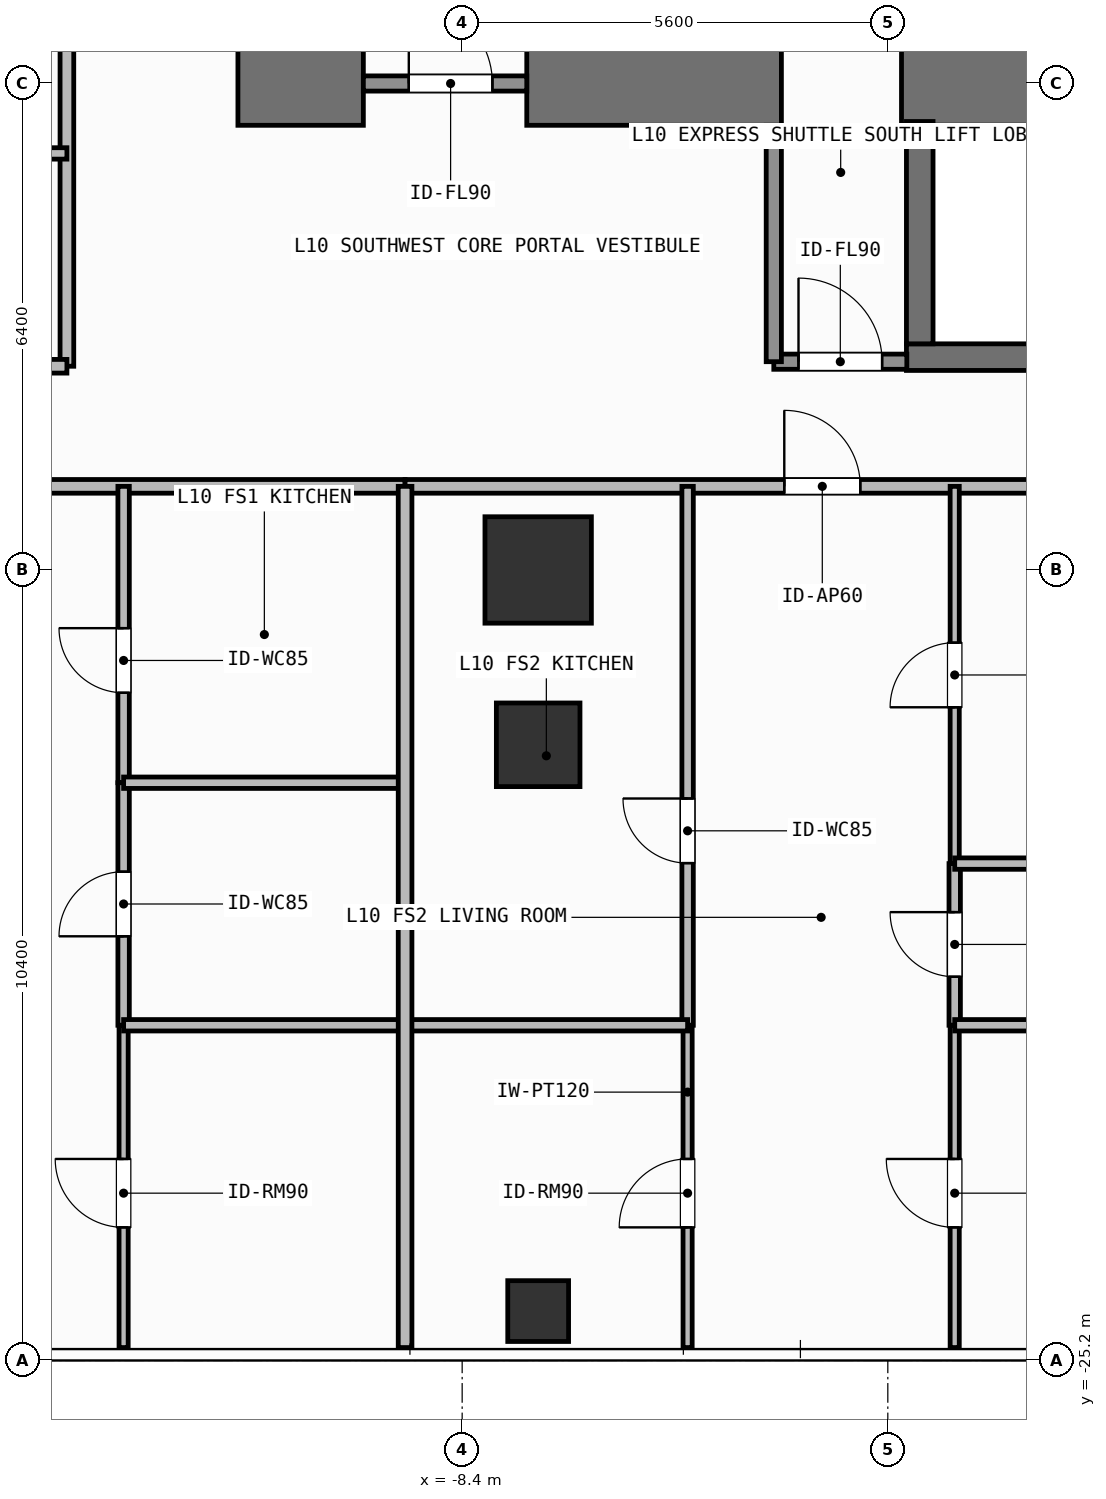
"""IFC4 building model, lengths in metres.
Left out: names, types, materials, properties, quantities, classifications, styles, units other than length and angle.
Written with IfcOpenShell. Run it as: python <this file> out.ifc"""

import sys

from ifc_helpers import new_model, si_unit, direction, frame, frame_2d, origin, origin_2d, place, context, subcontext, project, spatial, rectangle, hollow_rectangle, extrude, element, fill, save


model = new_model("IFC4")
c1 = context("Model", 3, precision=1e-05, world=origin(), true_north=direction((0.0, 1.0)))
c2 = subcontext(c1, "Body", "Model", "MODEL_VIEW")
j1 = project(units=[si_unit("LENGTHUNIT", "METRE"), si_unit("PLANEANGLEUNIT", "RADIAN")], contexts=[c1])
p1 = place(None, origin())
s1 = spatial("IfcSite", under=j1, at=p1, CompositionType="ELEMENT")
p2 = place(p1, origin())
s2 = spatial("IfcBuilding", under=s1, at=p2, CompositionType="ELEMENT")
p3 = place(p2, frame((0.0, 0.0, 38.4)))
s3 = spatial("IfcBuildingStorey", under=s2, at=p3, CompositionType="ELEMENT", Elevation=38.4)
p4 = place(p3, frame((-11.35, -8.4, 0.0), z_axis=(0.0, 0.0, 1.0), x_axis=(1.0, 0.0, 0.0)))
e1 = element("IfcWall", 1, at=p4, inside=s3, PredefinedType="SHEAR", context=c2, shape_type="SweptSolid", body=[
    extrude(rectangle(XDim=1.65, YDim=1.1, at=frame_2d((0.825, 0.0))), origin(), (0.0, 0.0, 1.0), 3.9),
])
p5 = place(p3, frame((-7.55, -8.4, 0.0), z_axis=(0.0, 0.0, 1.0), x_axis=(1.0, 0.0, 0.0)))
e2 = element("IfcWall", 2, at=p5, inside=s3, PredefinedType="SHEAR", context=c2, shape_type="SweptSolid", body=[
    extrude(rectangle(XDim=3.35, YDim=1.1, at=frame_2d((1.675, 0.0))), origin(), (0.0, 0.0, 1.0), 3.9),
])
p6 = place(p3, frame((-2.62, -8.4, 0.0), z_axis=(0.0, 0.0, 1.0), x_axis=(1.0, 0.0, 0.0)))
e3 = element("IfcWall", 3, at=p6, inside=s3, PredefinedType="SHEAR", context=c2, shape_type="SweptSolid", body=[
    extrude(rectangle(XDim=7.27, YDim=1.1, at=frame_2d((3.635, 0.0))), origin(), (0.0, 0.0, 1.0), 3.9),
])
p7 = place(p3, frame((-2.555, -12.0, 0.0), z_axis=(0.0, 0.0, 1.0), x_axis=(1.0, 0.0, 0.0)))
e4 = element("IfcWall", 4, at=p7, inside=s3, PredefinedType="SHEAR", context=c2, shape_type="SweptSolid", body=[
    extrude(rectangle(XDim=7.31, YDim=0.35, at=frame_2d((3.655, 0.0))), origin(), (0.0, 0.0, 1.0), 3.9),
])
p8 = place(p3, frame((-2.2, -8.988, 0.0), z_axis=(0.0, 0.0, 1.0), x_axis=(1.0, 0.0, 0.0)))
e5 = element("IfcWall", 5, at=p8, inside=s3, PredefinedType="SHEAR", context=c2, shape_type="SweptSolid", body=[
    extrude(rectangle(XDim=6.6, YDim=0.075, at=frame_2d((3.3, 0.0))), origin(), (0.0, 0.0, 1.0), 3.9),
])
p9 = place(p3, frame((-2.38, -11.825, 0.0), z_axis=(0.0, 0.0, 1.0), x_axis=(0.0, 1.0, 0.0)))
e6 = element("IfcWall", 6, at=p9, inside=s3, PredefinedType="SHEAR", context=c2, shape_type="SweptSolid", body=[
    extrude(rectangle(XDim=2.925, YDim=0.35, at=frame_2d((1.462, 0.0))), origin(), (0.0, 0.0, 1.0), 3.9),
])
p10 = place(p3, frame((-7.4, -14.8, 0.0), z_axis=(0.0, 0.0, 1.0), x_axis=(1.0, 0.0, 0.0)))
e7 = element("IfcColumn", 7, at=p10, inside=s3, PredefinedType="COLUMN", context=c2, shape_type="SweptSolid", body=[
    extrude(rectangle(XDim=1.4, YDim=1.4, at=origin_2d()), origin(), (0.0, 0.0, 1.0), 3.9),
])
p11 = place(p3, frame((-7.4, -17.1, 0.0), z_axis=(0.0, 0.0, 1.0), x_axis=(1.0, 0.0, 0.0)))
e8 = element("IfcColumn", 8, at=p11, inside=s3, PredefinedType="COLUMN", context=c2, shape_type="SweptSolid", body=[
    extrude(rectangle(XDim=1.1, YDim=1.1, at=origin_2d()), origin(), (0.0, 0.0, 1.0), 3.9),
])
p12 = place(p3, frame((-7.4, -24.55, 0.0), z_axis=(0.0, 0.0, 1.0), x_axis=(1.0, 0.0, 0.0)))
e9 = element("IfcColumn", 9, at=p12, inside=s3, PredefinedType="COLUMN", context=c2, shape_type="SweptSolid", body=[
    extrude(hollow_rectangle(XDim=0.8, YDim=0.8, WallThickness=0.036, at=origin_2d()), origin(), (0.0, 0.0, 1.0), 3.9),
])
p13 = place(p3, frame((-9.7, -8.4, 0.0), z_axis=(0.0, 0.0, 1.0), x_axis=(1.0, 0.0, 0.0)))
e10 = element("IfcWall", 10, at=p13, inside=s3, PredefinedType="SOLIDWALL", context=c2, shape_type="SweptSolid", body=[
    extrude(rectangle(XDim=2.15, YDim=0.2, at=frame_2d((1.075, 0.0))), origin(), (0.0, 0.0, 1.0), 2.72),
])
p14 = place(p13, frame((0.598, 0.0, 0.0)))
e11 = element("IfcOpeningElement", 11, at=p14, cuts=e10, PredefinedType="OPENING", context=c2, shape_type="SweptSolid", body=[
    extrude(rectangle(XDim=1.1, YDim=2.15, at=frame_2d((0.55, 1.075))), frame((0.0, 0.11, 0.0), z_axis=(0.0, -1.0, 0.0), x_axis=(1.0, 0.0, 0.0)), (0.0, 0.0, 1.0), 0.22),
])
p15 = place(p3, frame((-4.3, -12.06, 0.0), z_axis=(0.0, 0.0, 1.0), x_axis=(1.0, 0.0, 0.0)))
e12 = element("IfcWall", 12, at=p15, inside=s3, PredefinedType="SOLIDWALL", context=c2, shape_type="SweptSolid", body=[
    extrude(rectangle(XDim=1.75, YDim=0.2, at=frame_2d((0.875, 0.0))), origin(), (0.0, 0.0, 1.0), 3.68),
])
p16 = place(p15, frame((0.325, 0.0, 0.0)))
e13 = element("IfcOpeningElement", 13, at=p16, cuts=e12, PredefinedType="OPENING", context=c2, shape_type="SweptSolid", body=[
    extrude(rectangle(XDim=1.1, YDim=2.15, at=frame_2d((0.55, 1.075))), frame((0.0, 0.11, 0.0), z_axis=(0.0, -1.0, 0.0), x_axis=(1.0, 0.0, 0.0)), (0.0, 0.0, 1.0), 0.22),
])
p17 = place(p3, frame((-18.62, -13.7, 0.0), z_axis=(0.0, 0.0, 1.0), x_axis=(1.0, 0.0, 0.0)))
e14 = element("IfcWall", 14, at=p17, inside=s3, PredefinedType="PARTITIONING", context=c2, shape_type="SweptSolid", body=[
    extrude(rectangle(XDim=9.469, YDim=0.18, at=frame_2d((4.735, 0.0))), origin(), (0.0, 0.0, 1.0), 3.68),
])
p18 = place(p17, frame((1.931, 0.0, 0.0)))
e15 = element("IfcOpeningElement", 15, at=p18, cuts=e14, PredefinedType="OPENING", context=c2, shape_type="SweptSolid", body=[
    extrude(rectangle(XDim=1.0, YDim=2.2, at=frame_2d((0.5, 1.1))), frame((0.0, 0.1, 0.0), z_axis=(0.0, -1.0, 0.0), x_axis=(1.0, 0.0, 0.0)), (0.0, 0.0, 1.0), 0.2),
])
p19 = place(p3, frame((-12.854, -17.599, 0.0), z_axis=(0.0, 0.0, 1.0), x_axis=(0.0, 1.0, 0.0)))
e16 = element("IfcWall", 16, at=p19, inside=s3, PredefinedType="PARTITIONING", context=c2, shape_type="SweptSolid", body=[
    extrude(rectangle(XDim=3.899, YDim=0.15, at=frame_2d((1.95, 0.0))), origin(), (0.0, 0.0, 1.0), 3.68),
])
p20 = place(p19, frame((1.183, 0.0, 0.0)))
e17 = element("IfcOpeningElement", 17, at=p20, cuts=e16, PredefinedType="OPENING", context=c2, shape_type="SweptSolid", body=[
    extrude(rectangle(XDim=0.85, YDim=2.1, at=frame_2d((0.425, 1.05))), frame((0.0, 0.085, 0.0), z_axis=(0.0, -1.0, 0.0), x_axis=(1.0, 0.0, 0.0)), (0.0, 0.0, 1.0), 0.17),
])
p21 = place(p3, frame((-12.854, -20.79, 0.0), z_axis=(0.0, 0.0, 1.0), x_axis=(0.0, 1.0, 0.0)))
e18 = element("IfcWall", 18, at=p21, inside=s3, PredefinedType="PARTITIONING", context=c2, shape_type="SweptSolid", body=[
    extrude(rectangle(XDim=3.191, YDim=0.15, at=frame_2d((1.595, 0.0))), origin(), (0.0, 0.0, 1.0), 3.68),
])
p22 = place(p21, frame((1.17, 0.0, 0.0)))
e19 = element("IfcOpeningElement", 19, at=p22, cuts=e18, PredefinedType="OPENING", context=c2, shape_type="SweptSolid", body=[
    extrude(rectangle(XDim=0.85, YDim=2.1, at=frame_2d((0.425, 1.05))), frame((0.0, 0.085, 0.0), z_axis=(0.0, -1.0, 0.0), x_axis=(1.0, 0.0, 0.0)), (0.0, 0.0, 1.0), 0.17),
])
p23 = place(p3, frame((-12.854, -25.03, 0.0), z_axis=(0.0, 0.0, 1.0), x_axis=(0.0, 1.0, 0.0)))
e20 = element("IfcWall", 20, at=p23, inside=s3, PredefinedType="PARTITIONING", context=c2, shape_type="SweptSolid", body=[
    extrude(rectangle(XDim=4.24, YDim=0.12, at=frame_2d((2.12, 0.0))), origin(), (0.0, 0.0, 1.0), 3.68),
])
p24 = place(p23, frame((1.581, 0.0, 0.0)))
e21 = element("IfcOpeningElement", 21, at=p24, cuts=e20, PredefinedType="OPENING", context=c2, shape_type="SweptSolid", body=[
    extrude(rectangle(XDim=0.9, YDim=2.1, at=frame_2d((0.45, 1.05))), frame((0.0, 0.07, 0.0), z_axis=(0.0, -1.0, 0.0), x_axis=(1.0, 0.0, 0.0)), (0.0, 0.0, 1.0), 0.14),
])
p25 = place(p3, frame((-9.151, -13.7, 0.0), z_axis=(0.0, 0.0, 1.0), x_axis=(1.0, 0.0, 0.0)))
e22 = element("IfcWall", 22, at=p25, inside=s3, PredefinedType="PARTITIONING", context=c2, shape_type="SweptSolid", body=[
    extrude(rectangle(XDim=12.051, YDim=0.18, at=frame_2d((6.025, 0.0))), origin(), (0.0, 0.0, 1.0), 3.68),
])
p26 = place(p25, frame((4.989, 0.0, 0.0)))
e23 = element("IfcOpeningElement", 23, at=p26, cuts=e22, PredefinedType="OPENING", context=c2, shape_type="SweptSolid", body=[
    extrude(rectangle(XDim=1.0, YDim=2.2, at=frame_2d((0.5, 1.1))), frame((0.0, 0.1, 0.0), z_axis=(0.0, -1.0, 0.0), x_axis=(1.0, 0.0, 0.0)), (0.0, 0.0, 1.0), 0.2),
])
p27 = place(p3, frame((-5.434, -20.79, 0.0), z_axis=(0.0, 0.0, 1.0), x_axis=(0.0, 1.0, 0.0)))
e24 = element("IfcWall", 24, at=p27, inside=s3, PredefinedType="PARTITIONING", context=c2, shape_type="SweptSolid", body=[
    extrude(rectangle(XDim=7.09, YDim=0.15, at=frame_2d((3.545, 0.0))), origin(), (0.0, 0.0, 1.0), 3.68),
])
p28 = place(p27, frame((2.133, 0.0, 0.0)))
e25 = element("IfcOpeningElement", 25, at=p28, cuts=e24, PredefinedType="OPENING", context=c2, shape_type="SweptSolid", body=[
    extrude(rectangle(XDim=0.85, YDim=2.1, at=frame_2d((0.425, 1.05))), frame((0.0, 0.085, 0.0), z_axis=(0.0, -1.0, 0.0), x_axis=(1.0, 0.0, 0.0)), (0.0, 0.0, 1.0), 0.17),
])
p29 = place(p3, frame((-5.434, -25.03, 0.0), z_axis=(0.0, 0.0, 1.0), x_axis=(0.0, 1.0, 0.0)))
e26 = element("IfcWall", 26, at=p29, inside=s3, PredefinedType="PARTITIONING", context=c2, shape_type="SweptSolid", body=[
    extrude(rectangle(XDim=4.24, YDim=0.12, at=frame_2d((2.12, 0.0))), origin(), (0.0, 0.0, 1.0), 3.68),
])
p30 = place(p29, frame((1.581, 0.0, 0.0)))
e27 = element("IfcOpeningElement", 27, at=p30, cuts=e26, PredefinedType="OPENING", context=c2, shape_type="SweptSolid", body=[
    extrude(rectangle(XDim=0.9, YDim=2.1, at=frame_2d((0.45, 1.05))), frame((0.0, 0.07, 0.0), z_axis=(0.0, -1.0, 0.0), x_axis=(1.0, 0.0, 0.0)), (0.0, 0.0, 1.0), 0.14),
])
p31 = place(p3, frame((-1.92, -20.79, 0.0), z_axis=(0.0, 0.0, 1.0), x_axis=(0.0, 1.0, 0.0)))
e28 = element("IfcWall", 28, at=p31, inside=s3, PredefinedType="PARTITIONING", context=c2, shape_type="SweptSolid", body=[
    extrude(rectangle(XDim=2.127, YDim=0.15, at=frame_2d((1.063, 0.0))), origin(), (0.0, 0.0, 1.0), 3.68),
])
p32 = place(p31, frame((0.638, 0.0, 0.0)))
e29 = element("IfcOpeningElement", 29, at=p32, cuts=e28, PredefinedType="OPENING", context=c2, shape_type="SweptSolid", body=[
    extrude(rectangle(XDim=0.85, YDim=2.1, at=frame_2d((0.425, 1.05))), frame((0.0, 0.085, 0.0), z_axis=(0.0, -1.0, 0.0), x_axis=(1.0, 0.0, 0.0)), (0.0, 0.0, 1.0), 0.17),
])
p33 = place(p3, frame((-1.92, -18.663, 0.0), z_axis=(0.0, 0.0, 1.0), x_axis=(0.0, 1.0, 0.0)))
e30 = element("IfcWall", 30, at=p33, inside=s3, PredefinedType="PARTITIONING", context=c2, shape_type="SweptSolid", body=[
    extrude(rectangle(XDim=4.963, YDim=0.12, at=frame_2d((2.481, 0.0))), origin(), (0.0, 0.0, 1.0), 3.68),
])
p34 = place(p33, frame((2.056, 0.0, 0.0)))
e31 = element("IfcOpeningElement", 31, at=p34, cuts=e30, PredefinedType="OPENING", context=c2, shape_type="SweptSolid", body=[
    extrude(rectangle(XDim=0.85, YDim=2.1, at=frame_2d((0.425, 1.05))), frame((0.0, 0.07, 0.0), z_axis=(0.0, -1.0, 0.0), x_axis=(1.0, 0.0, 0.0)), (0.0, 0.0, 1.0), 0.14),
])
p35 = place(p3, frame((-1.92, -25.03, 0.0), z_axis=(0.0, 0.0, 1.0), x_axis=(0.0, 1.0, 0.0)))
e32 = element("IfcWall", 32, at=p35, inside=s3, PredefinedType="PARTITIONING", context=c2, shape_type="SweptSolid", body=[
    extrude(rectangle(XDim=4.24, YDim=0.12, at=frame_2d((2.12, 0.0))), origin(), (0.0, 0.0, 1.0), 3.68),
])
p36 = place(p35, frame((1.581, 0.0, 0.0)))
e33 = element("IfcOpeningElement", 33, at=p36, cuts=e32, PredefinedType="OPENING", context=c2, shape_type="SweptSolid", body=[
    extrude(rectangle(XDim=0.9, YDim=2.1, at=frame_2d((0.45, 1.05))), frame((0.0, 0.07, 0.0), z_axis=(0.0, -1.0, 0.0), x_axis=(1.0, 0.0, 0.0)), (0.0, 0.0, 1.0), 0.14),
])
p37 = place(p3, frame((-13.6, -12.12, 0.0), z_axis=(0.0, 0.0, 1.0), x_axis=(0.0, 1.0, 0.0)))
e34 = element("IfcWall", 34, at=p37, inside=s3, PredefinedType="PARTITIONING", context=c2, shape_type="SweptSolid", body=[
    extrude(rectangle(XDim=12.847, YDim=0.18, at=frame_2d((6.424, 0.0))), origin(), (0.0, 0.0, 1.0), 3.68),
])
p38 = place(p37, frame((5.48, 0.0, 0.0)))
e35 = element("IfcOpeningElement", 35, at=p38, cuts=e34, PredefinedType="OPENING", context=c2, shape_type="SweptSolid", body=[
    extrude(rectangle(XDim=1.0, YDim=2.2, at=frame_2d((0.5, 1.1))), frame((0.0, 0.1, 0.0), z_axis=(0.0, -1.0, 0.0), x_axis=(1.0, 0.0, 0.0)), (0.0, 0.0, 1.0), 0.2),
])
p39 = place(p3, frame((-16.808, -9.32, 0.0), z_axis=(0.0, 0.0, 1.0), x_axis=(1.0, 0.0, 0.0)))
e36 = element("IfcWall", 36, at=p39, inside=s3, PredefinedType="PARTITIONING", context=c2, shape_type="SweptSolid", body=[
    extrude(rectangle(XDim=3.208, YDim=0.15, at=frame_2d((1.604, 0.0))), origin(), (0.0, 0.0, 1.0), 3.68),
])
p40 = place(p39, frame((0.33, 0.0, 0.0)))
e37 = element("IfcOpeningElement", 37, at=p40, cuts=e36, PredefinedType="OPENING", context=c2, shape_type="SweptSolid", body=[
    extrude(rectangle(XDim=0.85, YDim=2.1, at=frame_2d((0.425, 1.05))), frame((0.0, 0.085, 0.0), z_axis=(0.0, -1.0, 0.0), x_axis=(1.0, 0.0, 0.0)), (0.0, 0.0, 1.0), 0.17),
])
p41 = place(p3, frame((-4.3, -12.06, 0.0), z_axis=(0.0, 0.0, 1.0), x_axis=(0.0, 1.0, 0.0)))
e38 = element("IfcWall", 38, at=p41, inside=s3, PredefinedType="SOLIDWALL", context=c2, shape_type="SweptSolid", body=[
    extrude(rectangle(XDim=3.11, YDim=0.2, at=frame_2d((1.555, 0.0))), origin(), (0.0, 0.0, 1.0), 3.68),
])
for number, where, z_axis, x_axis in (
    (39, (-12.854, -17.599, 0.0), (0.0, 0.0, 1.0), (1.0, 0.0, 0.0)),
    (40, (-12.854, -20.79, 0.0), (0.0, 0.0, 1.0), (1.0, 0.0, 0.0)),
):
    element("IfcWall", number, at=place(p3, frame(where, z_axis=z_axis, x_axis=x_axis)), inside=s3, PredefinedType="PARTITIONING", context=c2, shape_type="SweptSolid", body=[
        extrude(rectangle(XDim=3.703, YDim=0.15, at=frame_2d((1.852, 0.0))), origin(), (0.0, 0.0, 1.0), 3.68),
    ])
p42 = place(p3, frame((-9.151, -20.79, 0.0), z_axis=(0.0, 0.0, 1.0), x_axis=(1.0, 0.0, 0.0)))
e41 = element("IfcWall", 41, at=p42, inside=s3, PredefinedType="PARTITIONING", context=c2, shape_type="SweptSolid", body=[
    extrude(rectangle(XDim=3.717, YDim=0.15, at=frame_2d((1.858, 0.0))), origin(), (0.0, 0.0, 1.0), 3.68),
])
for number, where, z_axis, x_axis in (
    (42, (-1.92, -18.663, 0.0), (0.0, 0.0, 1.0), (1.0, 0.0, 0.0)),
    (43, (-1.92, -20.79, 0.0), (0.0, 0.0, 1.0), (1.0, 0.0, 0.0)),
):
    element("IfcWall", number, at=place(p3, frame(where, z_axis=z_axis, x_axis=x_axis)), inside=s3, PredefinedType="PARTITIONING", context=c2, shape_type="SweptSolid", body=[
        extrude(rectangle(XDim=4.82, YDim=0.15, at=frame_2d((2.41, 0.0))), origin(), (0.0, 0.0, 1.0), 3.68),
    ])
p43 = place(p3, frame((-9.151, -25.03, 0.0), z_axis=(0.0, 0.0, 1.0), x_axis=(0.0, 1.0, 0.0)))
e44 = element("IfcWall", 44, at=p43, inside=s3, PredefinedType="PARTITIONING", context=c2, shape_type="SweptSolid", body=[
    extrude(rectangle(XDim=11.33, YDim=0.18, at=frame_2d((5.665, 0.0))), origin(), (0.0, 0.0, 1.0), 3.68),
])
p44 = place(p3, frame((-22.13, -12.12, 0.0), z_axis=(0.0, 0.0, 1.0), x_axis=(1.0, 0.0, 0.0)))
e45 = element("IfcWall", 45, at=p44, inside=s3, PredefinedType="PARTITIONING", context=c2, shape_type="SweptSolid", body=[
    extrude(rectangle(XDim=8.53, YDim=0.18, at=frame_2d((4.265, 0.0))), origin(), (0.0, 0.0, 1.0), 3.68),
])
p45 = place(p14, origin())
e46 = element("IfcDoor", 46, at=p45, inside=s3, OperationType="SINGLE_SWING_LEFT", PredefinedType="DOOR", context=c2, shape_type="SweptSolid", body=[
    extrude(rectangle(XDim=1.1, YDim=2.15, at=frame_2d((0.55, 1.075))), frame((0.0, 0.025, 0.0), z_axis=(0.0, -1.0, 0.0), x_axis=(1.0, 0.0, 0.0)), (0.0, 0.0, 1.0), 0.05),
])
fill(e11, e46)
p46 = place(p16, origin())
e47 = element("IfcDoor", 47, at=p46, inside=s3, OperationType="SINGLE_SWING_LEFT", PredefinedType="DOOR", context=c2, shape_type="SweptSolid", body=[
    extrude(rectangle(XDim=1.1, YDim=2.15, at=frame_2d((0.55, 1.075))), frame((0.0, 0.025, 0.0), z_axis=(0.0, -1.0, 0.0), x_axis=(1.0, 0.0, 0.0)), (0.0, 0.0, 1.0), 0.05),
])
fill(e13, e47)
p47 = place(p20, origin())
e48 = element("IfcDoor", 48, at=p47, inside=s3, OperationType="SINGLE_SWING_RIGHT", PredefinedType="DOOR", context=c2, shape_type="SweptSolid", body=[
    extrude(rectangle(XDim=0.85, YDim=2.1, at=frame_2d((0.425, 1.05))), frame((0.0, 0.025, 0.0), z_axis=(0.0, -1.0, 0.0), x_axis=(1.0, 0.0, 0.0)), (0.0, 0.0, 1.0), 0.05),
])
fill(e17, e48)
p48 = place(p22, origin())
e49 = element("IfcDoor", 49, at=p48, inside=s3, OperationType="SINGLE_SWING_LEFT", PredefinedType="DOOR", context=c2, shape_type="SweptSolid", body=[
    extrude(rectangle(XDim=0.85, YDim=2.1, at=frame_2d((0.425, 1.05))), frame((0.0, 0.025, 0.0), z_axis=(0.0, -1.0, 0.0), x_axis=(1.0, 0.0, 0.0)), (0.0, 0.0, 1.0), 0.05),
])
fill(e19, e49)
p49 = place(p24, origin())
e50 = element("IfcDoor", 50, at=p49, inside=s3, OperationType="SINGLE_SWING_RIGHT", PredefinedType="DOOR", context=c2, shape_type="SweptSolid", body=[
    extrude(rectangle(XDim=0.9, YDim=2.1, at=frame_2d((0.45, 1.05))), frame((0.0, 0.025, 0.0), z_axis=(0.0, -1.0, 0.0), x_axis=(1.0, 0.0, 0.0)), (0.0, 0.0, 1.0), 0.05),
])
fill(e21, e50)
p50 = place(p26, origin())
e51 = element("IfcDoor", 51, at=p50, inside=s3, OperationType="SINGLE_SWING_LEFT", PredefinedType="DOOR", context=c2, shape_type="SweptSolid", body=[
    extrude(rectangle(XDim=1.0, YDim=2.2, at=frame_2d((0.5, 1.1))), frame((0.0, 0.025, 0.0), z_axis=(0.0, -1.0, 0.0), x_axis=(1.0, 0.0, 0.0)), (0.0, 0.0, 1.0), 0.05),
])
fill(e23, e51)
p51 = place(p28, origin())
e52 = element("IfcDoor", 52, at=p51, inside=s3, OperationType="SINGLE_SWING_RIGHT", PredefinedType="DOOR", context=c2, shape_type="SweptSolid", body=[
    extrude(rectangle(XDim=0.85, YDim=2.1, at=frame_2d((0.425, 1.05))), frame((0.0, 0.025, 0.0), z_axis=(0.0, -1.0, 0.0), x_axis=(1.0, 0.0, 0.0)), (0.0, 0.0, 1.0), 0.05),
])
fill(e25, e52)
p52 = place(p30, origin())
e53 = element("IfcDoor", 53, at=p52, inside=s3, OperationType="SINGLE_SWING_LEFT", PredefinedType="DOOR", context=c2, shape_type="SweptSolid", body=[
    extrude(rectangle(XDim=0.9, YDim=2.1, at=frame_2d((0.45, 1.05))), frame((0.0, 0.025, 0.0), z_axis=(0.0, -1.0, 0.0), x_axis=(1.0, 0.0, 0.0)), (0.0, 0.0, 1.0), 0.05),
])
fill(e27, e53)
p53 = place(p32, origin())
e54 = element("IfcDoor", 54, at=p53, inside=s3, OperationType="SINGLE_SWING_RIGHT", PredefinedType="DOOR", context=c2, shape_type="SweptSolid", body=[
    extrude(rectangle(XDim=0.85, YDim=2.1, at=frame_2d((0.425, 1.05))), frame((0.0, 0.025, 0.0), z_axis=(0.0, -1.0, 0.0), x_axis=(1.0, 0.0, 0.0)), (0.0, 0.0, 1.0), 0.05),
])
fill(e29, e54)
p54 = place(p34, origin())
e55 = element("IfcDoor", 55, at=p54, inside=s3, OperationType="SINGLE_SWING_LEFT", PredefinedType="DOOR", context=c2, shape_type="SweptSolid", body=[
    extrude(rectangle(XDim=0.85, YDim=2.1, at=frame_2d((0.425, 1.05))), frame((0.0, 0.025, 0.0), z_axis=(0.0, -1.0, 0.0), x_axis=(1.0, 0.0, 0.0)), (0.0, 0.0, 1.0), 0.05),
])
fill(e31, e55)
p55 = place(p36, origin())
e56 = element("IfcDoor", 56, at=p55, inside=s3, OperationType="SINGLE_SWING_RIGHT", PredefinedType="DOOR", context=c2, shape_type="SweptSolid", body=[
    extrude(rectangle(XDim=0.9, YDim=2.1, at=frame_2d((0.45, 1.05))), frame((0.0, 0.025, 0.0), z_axis=(0.0, -1.0, 0.0), x_axis=(1.0, 0.0, 0.0)), (0.0, 0.0, 1.0), 0.05),
])
fill(e33, e56)
save(model, sys.argv[1])
